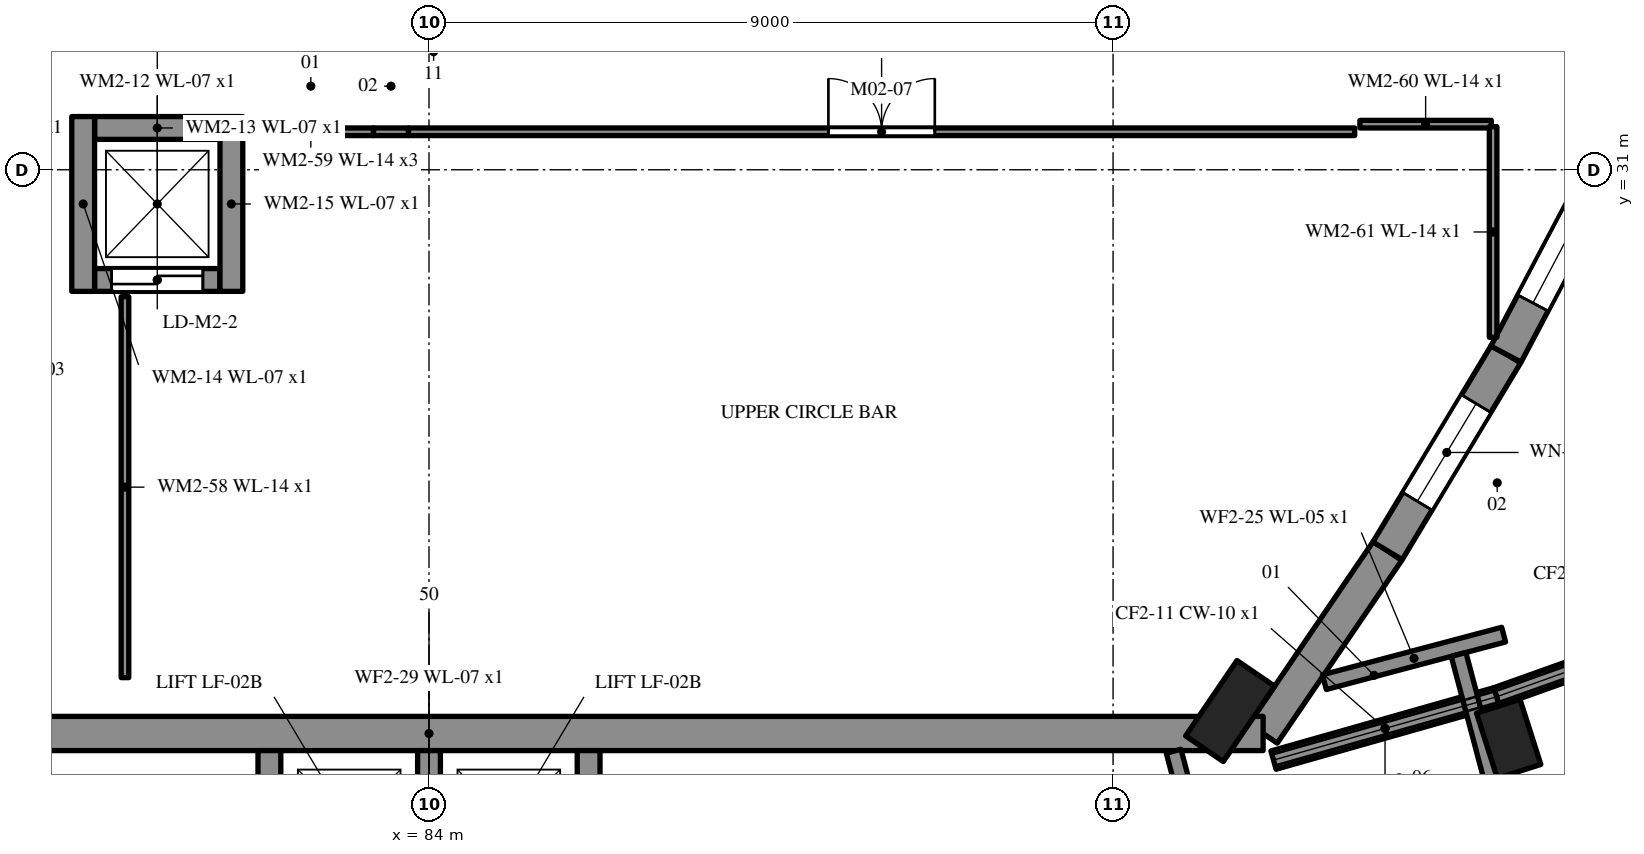
"""IFC4 building model, lengths in metres.
Left out: names, types, materials, properties, quantities, classifications, styles, units other than length and angle.
Written with IfcOpenShell. Run it as: python <this file> out.ifc"""

import sys

from ifc_helpers import new_model, si_unit, direction, frame, frame_2d, origin, origin_2d, place, context, subcontext, project, spatial, polyline, rectangle, outline, extrude, element, fill, save


model = new_model("IFC4")
c1 = context("Model", 3, precision=1e-05, world=origin(), true_north=direction((0.0, 1.0)))
c2 = subcontext(c1, "Body", "Model", "MODEL_VIEW")
j1 = project(units=[si_unit("LENGTHUNIT", "METRE"), si_unit("PLANEANGLEUNIT", "RADIAN")], contexts=[c1])
p1 = place(None, origin())
s1 = spatial("IfcSite", under=j1, at=p1, CompositionType="ELEMENT")
p2 = place(p1, origin())
s2 = spatial("IfcBuilding", under=s1, at=p2, CompositionType="ELEMENT")
p3 = place(p2, frame((0.0, 0.0, 10.2)))
s3 = spatial("IfcBuildingStorey", under=s2, at=p3, CompositionType="ELEMENT", Elevation=10.2)
p4 = place(p3, frame((94.974, 23.583, 0.0), z_axis=(0.0, 0.0, 1.0), x_axis=(0.5629642644, 0.826481238147, 0.0)))
e1 = element("IfcWall", 1, at=p4, inside=s3, PredefinedType="SOLIDWALL", context=c2, shape_type="SweptSolid", body=[
    extrude(rectangle(XDim=2.908, YDim=0.45, at=frame_2d((1.454, 0.0))), origin(), (0.0, 0.0, 1.0), 4.6),
])
p5 = place(p3, frame((96.611, 25.986, 0.0), z_axis=(0.0, 0.0, 1.0), x_axis=(0.515636119523, 0.856807675177, 0.0)))
e2 = element("IfcWall", 2, at=p5, inside=s3, PredefinedType="SOLIDWALL", context=c2, shape_type="SweptSolid", body=[
    extrude(rectangle(XDim=3.021, YDim=0.45, at=frame_2d((1.511, 0.0))), origin(), (0.0, 0.0, 1.0), 4.6),
])
p6 = place(p5, frame((0.76, 0.0, 0.9)))
e3 = element("IfcOpeningElement", 3, at=p6, cuts=e2, PredefinedType="OPENING", context=c2, shape_type="SweptSolid", body=[
    extrude(rectangle(XDim=1.5, YDim=2.1, at=frame_2d((0.75, 1.05))), frame((0.0, 0.235, 0.0), z_axis=(0.0, -1.0, 0.0), x_axis=(1.0, 0.0, 0.0)), (0.0, 0.0, 1.0), 0.47),
])
p7 = place(p3, frame((98.169, 28.575, 0.0), z_axis=(0.0, 0.0, 1.0), x_axis=(0.466728769487, 0.884400506407, 0.0)))
e4 = element("IfcWall", 4, at=p7, inside=s3, PredefinedType="SOLIDWALL", context=c2, shape_type="SweptSolid", body=[
    extrude(rectangle(XDim=3.021, YDim=0.45, at=frame_2d((1.51, 0.0))), origin(), (0.0, 0.0, 1.0), 4.6),
])
p8 = place(p7, frame((0.76, 0.0, 0.9)))
e5 = element("IfcOpeningElement", 5, at=p8, cuts=e4, PredefinedType="OPENING", context=c2, shape_type="SweptSolid", body=[
    extrude(rectangle(XDim=1.5, YDim=2.1, at=frame_2d((0.75, 1.05))), frame((0.0, 0.235, 0.0), z_axis=(0.0, -1.0, 0.0), x_axis=(1.0, 0.0, 0.0)), (0.0, 0.0, 1.0), 0.47),
])
p9 = place(p3, frame((73.026, 23.583, 0.0), z_axis=(0.0, 0.0, 1.0), x_axis=(1.0, 0.0, 0.0)))
e6 = element("IfcWall", 6, at=p9, inside=s3, PredefinedType="SOLIDWALL", context=c2, shape_type="SweptSolid", body=[
    extrude(rectangle(XDim=21.948, YDim=0.45, at=frame_2d((10.974, 0.0))), origin(), (0.0, 0.0, 1.0), 4.6),
])
p10 = place(p3, frame((94.54, 23.878, 0.0), z_axis=(0.0, 0.0, 1.0), x_axis=(0.562978035902, 0.82647185741, 0.0)))
e7 = element("IfcColumn", 7, at=p10, inside=s3, PredefinedType="PILASTER", context=c2, shape_type="SweptSolid", body=[
    extrude(rectangle(XDim=1.2, YDim=0.6, at=origin_2d()), origin(), (0.0, 0.0, 1.0), 4.6),
])
p11 = place(p3, frame((79.6, 29.55, 0.0), z_axis=(0.0, 0.0, 1.0), x_axis=(1.0, 0.0, 0.0)))
e8 = element("IfcWall", 8, at=p11, inside=s3, PredefinedType="SHEAR", context=c2, shape_type="SweptSolid", body=[
    extrude(rectangle(XDim=1.65, YDim=0.3, at=frame_2d((0.825, 0.0))), origin(), (0.0, 0.0, 1.0), 4.6),
])
p12 = place(p11, frame((0.225, 0.0, 0.0)))
e9 = element("IfcOpeningElement", 9, at=p12, cuts=e8, PredefinedType="OPENING", context=c2, shape_type="SweptSolid", body=[
    extrude(rectangle(XDim=1.2, YDim=2.2, at=frame_2d((0.6, 1.1))), frame((0.0, 0.16, 0.0), z_axis=(0.0, -1.0, 0.0), x_axis=(1.0, 0.0, 0.0)), (0.0, 0.0, 1.0), 0.32),
])
p13 = place(p3, frame((81.25, 31.55, 0.0), z_axis=(0.0, 0.0, 1.0), x_axis=(-1.0, 0.0, 0.0)))
e10 = element("IfcWall", 10, at=p13, inside=s3, PredefinedType="SHEAR", context=c2, shape_type="SweptSolid", body=[
    extrude(rectangle(XDim=1.65, YDim=0.3, at=frame_2d((0.825, 0.0))), origin(), (0.0, 0.0, 1.0), 4.6),
])
for number, where, z_axis, x_axis in (
    (11, (79.45, 31.7, 0.0), (0.0, 0.0, 1.0), (0.0, -1.0, 0.0)),
    (12, (81.4, 29.4, 0.0), (0.0, 0.0, 1.0), (0.0, 1.0, 0.0)),
):
    element("IfcWall", number, at=place(p3, frame(where, z_axis=z_axis, x_axis=x_axis)), inside=s3, PredefinedType="SHEAR", context=c2, shape_type="SweptSolid", body=[
        extrude(rectangle(XDim=2.3, YDim=0.3, at=frame_2d((1.15, 0.0))), origin(), (0.0, 0.0, 1.0), 4.6),
    ])
p14 = place(p3, frame((98.205, 23.513, 0.0), z_axis=(0.0, 0.0, 1.0), x_axis=(0.304171062495, -0.952617428321, 0.0)))
e13 = element("IfcColumn", 13, at=p14, inside=s3, PredefinedType="PILASTER", context=c2, shape_type="SweptSolid", body=[
    extrude(rectangle(XDim=0.9, YDim=0.6, at=origin_2d()), origin(), (0.0, 0.0, 1.0), 3.611),
])
p15 = place(p3, frame((100.907, 25.085, 2.706), z_axis=(0.0, 0.0, 1.0), x_axis=(-0.941947191525, -0.335761058459, 0.0)))
e14 = element("IfcWall", 14, at=p15, inside=s3, PredefinedType="SHEAR", context=c2, shape_type="SweptSolid", body=[
    extrude(outline(polyline([(0.0, 0.0), (3.038, 0.0), (3.038, 1.349), (2.762, 1.275), (0.0, 0.449), (0.0, 0.0)])), frame((0.0, 0.125, 0.0), z_axis=(0.0, -1.0, 0.0), x_axis=(1.0, 0.0, 0.0)), (0.0, 0.0, 1.0), 0.25),
])
p16 = place(p3, frame((98.046, 24.065, 3.607), z_axis=(0.0, 0.0, 1.0), x_axis=(-0.962032579716, -0.272934636065, 0.0)))
e15 = element("IfcWall", 15, at=p16, inside=s3, PredefinedType="SHEAR", context=c2, shape_type="SweptSolid", body=[
    extrude(outline(polyline([(0.0, 0.0), (3.051, 0.0), (3.051, 1.258), (0.277, 0.516), (0.0, 0.449), (0.0, 0.0)])), frame((0.0, 0.125, 0.0), z_axis=(0.0, -1.0, 0.0), x_axis=(1.0, 0.0, 0.0)), (0.0, 0.0, 1.0), 0.25),
])
p17 = place(p3, frame((80.0, 24.318, 0.0), z_axis=(0.0, 0.0, 1.0), x_axis=(0.0, 1.0, 0.0)))
e16 = element("IfcWall", 16, at=p17, inside=s3, PredefinedType="PARTITIONING", context=c2, shape_type="SweptSolid", body=[
    extrude(rectangle(XDim=5.012, YDim=0.1, at=frame_2d((2.506, 0.0))), origin(), (0.0, 0.0, 1.0), 4.35),
])
p18 = place(p3, frame((81.62, 31.5, 0.0), z_axis=(0.0, 0.0, 1.0), x_axis=(1.0, 0.0, 0.0)))
e17 = element("IfcWall", 17, at=p18, inside=s3, PredefinedType="PARTITIONING", context=c2, shape_type="SweptSolid", body=[
    extrude(rectangle(XDim=1.65, YDim=0.1, at=frame_2d((0.825, 0.0))), origin(), (0.0, 0.0, 1.0), 4.35),
])
p19 = place(p3, frame((83.27, 31.5, 0.0), z_axis=(0.0, 0.0, 1.0), x_axis=(1.0, 0.0, 0.0)))
e18 = element("IfcWall", 18, at=p19, inside=s3, PredefinedType="PARTITIONING", context=c2, shape_type="SweptSolid", body=[
    extrude(rectangle(XDim=0.46, YDim=0.1, at=frame_2d((0.23, 0.0))), origin(), (0.0, 0.0, 1.0), 3.52),
])
p20 = place(p3, frame((83.73, 31.5, 0.0), z_axis=(0.0, 0.0, 1.0), x_axis=(1.0, 0.0, 0.0)))
e19 = element("IfcWall", 19, at=p20, inside=s3, PredefinedType="PARTITIONING", context=c2, shape_type="SweptSolid", body=[
    extrude(rectangle(XDim=12.449, YDim=0.1, at=frame_2d((6.225, 0.0))), origin(), (0.0, 0.0, 1.0), 4.35),
])
p21 = place(p20, frame((5.525, 0.0, 0.0)))
e20 = element("IfcOpeningElement", 20, at=p21, cuts=e19, PredefinedType="OPENING", context=c2, shape_type="SweptSolid", body=[
    extrude(rectangle(XDim=1.4, YDim=2.1, at=frame_2d((0.7, 1.05))), frame((0.0, 0.06, 0.0), z_axis=(0.0, -1.0, 0.0), x_axis=(1.0, 0.0, 0.0)), (0.0, 0.0, 1.0), 0.12),
])
p22 = place(p3, frame((96.248, 31.6, 0.0), z_axis=(0.0, 0.0, 1.0), x_axis=(1.0, 0.0, 0.0)))
e21 = element("IfcWall", 21, at=p22, inside=s3, PredefinedType="PARTITIONING", context=c2, shape_type="SweptSolid", body=[
    extrude(rectangle(XDim=1.729, YDim=0.1, at=frame_2d((0.865, 0.0))), origin(), (0.0, 0.0, 1.0), 4.35),
])
p23 = place(p3, frame((98.0, 31.567, 0.0), z_axis=(0.0, 0.0, 1.0), x_axis=(0.0, -1.0, 0.0)))
e22 = element("IfcWall", 22, at=p23, inside=s3, PredefinedType="PARTITIONING", context=c2, shape_type="SweptSolid", body=[
    extrude(rectangle(XDim=2.771, YDim=0.1, at=frame_2d((1.385, 0.0))), origin(), (0.0, 0.0, 1.0), 4.35),
])
p24 = place(p3, frame((98.138, 24.884, 0.0), z_axis=(0.0, 0.0, 1.0), x_axis=(-0.966582812495, -0.256354572009, 0.0)))
e23 = element("IfcWall", 23, at=p24, inside=s3, PredefinedType="SHEAR", context=c2, shape_type="SweptSolid", body=[
    extrude(rectangle(XDim=2.44, YDim=0.2, at=frame_2d((1.22, 0.0))), origin(), (0.0, 0.0, 1.0), 2.64),
])
p25 = place(p3, frame((99.596, 16.89, 0.0), z_axis=(0.0, 0.0, 1.0), x_axis=(-0.25631948932, 0.966592116352, 0.0)))
e24 = element("IfcWall", 24, at=p25, inside=s3, PredefinedType="SHEAR", context=c2, shape_type="SweptSolid", body=[
    extrude(rectangle(XDim=8.0, YDim=0.2, at=frame_2d((4.0, 0.0))), origin(), (0.0, 0.0, 1.0), 2.64),
])
p26 = place(p3, frame((95.778, 15.878, 0.0), z_axis=(0.0, 0.0, 1.0), x_axis=(-0.256333531377, 0.966588392591, 0.0)))
e25 = element("IfcWall", 25, at=p26, inside=s3, PredefinedType="SHEAR", context=c2, shape_type="SweptSolid", body=[
    extrude(rectangle(XDim=7.73, YDim=0.2, at=frame_2d((3.865, 0.0))), origin(), (0.0, 0.0, 1.0), 2.64),
])
for number, where, z_axis, x_axis in (
    (26, (81.9, 21.458, 0.0), (0.0, 0.0, 1.0), (0.0, 1.0, 0.0)),
    (27, (84.0, 21.458, 0.0), (0.0, 0.0, 1.0), (0.0, 1.0, 0.0)),
    (28, (86.1, 21.458, 0.0), (0.0, 0.0, 1.0), (0.0, 1.0, 0.0)),
):
    element("IfcWall", number, at=place(p3, frame(where, z_axis=z_axis, x_axis=x_axis)), inside=s3, PredefinedType="SHEAR", context=c2, shape_type="SweptSolid", body=[
        extrude(rectangle(XDim=1.9, YDim=0.3, at=frame_2d((0.95, 0.0))), origin(), (0.0, 0.0, 1.0), 4.6),
    ])
p27 = place(p12, origin())
e29 = element("IfcDoor", 29, at=p27, inside=s3, OperationType="SLIDING_TO_LEFT", PredefinedType="DOOR", context=c2, shape_type="SweptSolid", body=[
    extrude(rectangle(XDim=1.2, YDim=2.2, at=frame_2d((0.6, 1.1))), frame((0.0, 0.025, 0.0), z_axis=(0.0, -1.0, 0.0), x_axis=(1.0, 0.0, 0.0)), (0.0, 0.0, 1.0), 0.05),
])
fill(e9, e29)
p28 = place(p6, origin())
e30 = element("IfcWindow", 30, at=p28, inside=s3, PartitioningType="SINGLE_PANEL", PredefinedType="WINDOW", context=c2, shape_type="SweptSolid", body=[
    extrude(rectangle(XDim=1.5, YDim=2.1, at=frame_2d((0.75, 1.05))), frame((0.0, 0.03, 0.0), z_axis=(0.0, -1.0, 0.0), x_axis=(1.0, 0.0, 0.0)), (0.0, 0.0, 1.0), 0.06),
])
fill(e3, e30)
p29 = place(p8, origin())
e31 = element("IfcWindow", 31, at=p29, inside=s3, PartitioningType="SINGLE_PANEL", PredefinedType="WINDOW", context=c2, shape_type="SweptSolid", body=[
    extrude(rectangle(XDim=1.5, YDim=2.1, at=frame_2d((0.75, 1.05))), frame((0.0, 0.03, 0.0), z_axis=(0.0, -1.0, 0.0), x_axis=(1.0, 0.0, 0.0)), (0.0, 0.0, 1.0), 0.06),
])
fill(e5, e31)
p30 = place(p21, origin())
e32 = element("IfcDoor", 32, at=p30, inside=s3, OperationType="DOUBLE_DOOR_SINGLE_SWING", PredefinedType="DOOR", context=c2, shape_type="SweptSolid", body=[
    extrude(rectangle(XDim=1.4, YDim=2.1, at=frame_2d((0.7, 1.05))), frame((0.0, 0.025, 0.0), z_axis=(0.0, -1.0, 0.0), x_axis=(1.0, 0.0, 0.0)), (0.0, 0.0, 1.0), 0.05),
])
fill(e20, e32)
save(model, sys.argv[1])
